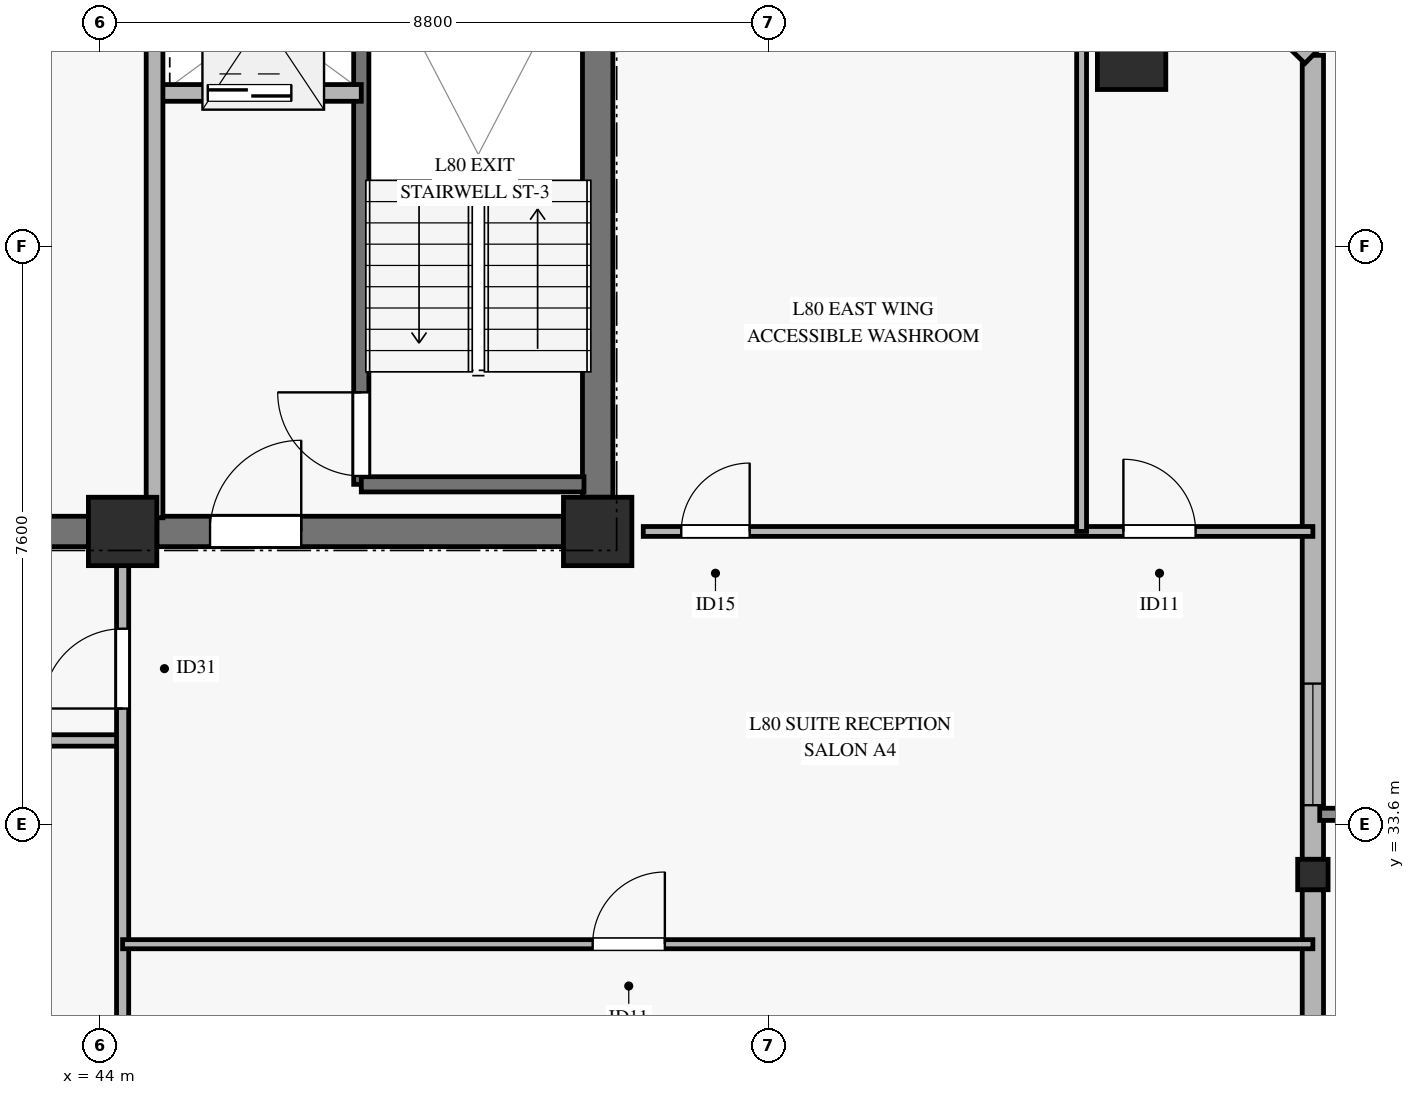
"""IFC4 building model, lengths in metres.
Left out: names, types, materials, properties, quantities, classifications, styles, units other than length and angle.
Written with IfcOpenShell. Run it as: python <this file> out.ifc"""

import sys

from ifc_helpers import new_model, si_unit, direction, frame, frame_2d, origin, origin_2d, place, context, subcontext, project, spatial, rectangle, hollow_rectangle, extrude, source, transform, mapped, element, fill, save


model = new_model("IFC4")
c1 = context("Model", 3, precision=1e-05, world=origin(), true_north=direction((0.0, 1.0)))
c2 = subcontext(c1, "Body", "Model", "MODEL_VIEW")
j1 = project(units=[si_unit("LENGTHUNIT", "METRE"), si_unit("PLANEANGLEUNIT", "RADIAN")], contexts=[c1])
p1 = place(None, origin())
s1 = spatial("IfcSite", under=j1, at=p1, CompositionType="ELEMENT")
p2 = place(p1, origin())
s2 = spatial("IfcBuilding", under=s1, at=p2, CompositionType="ELEMENT")
p3 = place(p2, frame((0.0, 0.0, 310.8)))
s3 = spatial("IfcBuildingStorey", under=s2, at=p3, CompositionType="ELEMENT", Elevation=310.8)
m1 = source(origin(), c2, "Body", "SweptSolid", [
    extrude(rectangle(XDim=0.9, YDim=0.9, at=origin_2d()), origin(), (0.0, 0.0, 1.0), 3.185),
])
for number, where, z_axis, x_axis in (
    (1, (44.3, 37.45, 0.0), (0.0, 0.0, 1.0), (1.0, 0.0, 0.0)),
    (2, (50.55, 37.45, 0.0), (0.0, 0.0, 1.0), (1.0, 0.0, 0.0)),
):
    element("IfcColumn", number, at=place(p3, frame(where, z_axis=z_axis, x_axis=x_axis)), inside=s3, PredefinedType="PILASTER", context=c2, shape_type="MappedRepresentation", body=[
        mapped(m1, transform((0.0, 0.0, 0.0), x_axis=(1.0, 0.0, 0.0), y_axis=(0.0, 1.0, 0.0), z_axis=(0.0, 0.0, 1.0), scale=1.0)),
    ])
p4 = place(p3, frame((36.05, 37.45, 0.0), z_axis=(0.0, 0.0, 1.0), x_axis=(1.0, 0.0, 0.0)))
e3 = element("IfcWall", 3, at=p4, inside=s3, PredefinedType="SHEAR", context=c2, shape_type="SweptSolid", body=[
    extrude(rectangle(XDim=7.8, YDim=0.4, at=frame_2d((3.9, 0.0))), origin(), (0.0, 0.0, 1.0), 3.185),
])
p5 = place(p3, frame((44.75, 37.45, 0.0), z_axis=(0.0, 0.0, 1.0), x_axis=(1.0, 0.0, 0.0)))
e4 = element("IfcWall", 4, at=p5, inside=s3, PredefinedType="SHEAR", context=c2, shape_type="SweptSolid", body=[
    extrude(rectangle(XDim=5.35, YDim=0.4, at=frame_2d((2.675, 0.0))), origin(), (0.0, 0.0, 1.0), 3.185),
])
p6 = place(p5, frame((0.7, 0.0, 0.0)))
e5 = element("IfcOpeningElement", 5, at=p6, cuts=e4, PredefinedType="OPENING", context=c2, shape_type="SweptSolid", body=[
    extrude(rectangle(XDim=1.2, YDim=2.15, at=frame_2d((0.6, 1.075))), frame((0.0, 0.21, 0.0), z_axis=(0.0, -1.0, 0.0), x_axis=(1.0, 0.0, 0.0)), (0.0, 0.0, 1.0), 0.42),
])
p7 = place(p3, frame((50.55, 37.9, 0.0), z_axis=(0.0, 0.0, 1.0), x_axis=(0.0, 1.0, 0.0)))
e6 = element("IfcWall", 6, at=p7, inside=s3, PredefinedType="SHEAR", context=c2, shape_type="SweptSolid", body=[
    extrude(rectangle(XDim=8.2, YDim=0.4, at=frame_2d((4.1, 0.0))), origin(), (0.0, 0.0, 1.0), 3.185),
])
m2 = source(origin(), c2, "Body", "SweptSolid", [
    extrude(hollow_rectangle(XDim=0.9, YDim=0.9, WallThickness=0.04, at=origin_2d()), origin(), (0.0, 0.0, 1.0), 3.207),
])
p8 = place(p3, frame((57.575, 43.715, 0.0), z_axis=(-0.114438458141, 0.014618884872, 0.993322771059), x_axis=(-0.126714787137, -0.991939193056, 0.0)))
e7 = element("IfcColumn", 7, at=p8, inside=s3, PredefinedType="COLUMN", context=c2, shape_type="MappedRepresentation", body=[
    mapped(m2, transform((0.0, 0.0, 0.0), x_axis=(1.0, 0.0, 0.0), y_axis=(0.0, 1.0, 0.0), z_axis=(0.0, 0.0, 1.0), scale=1.0)),
])
m3 = source(origin(), c2, "Body", "SweptSolid", [
    extrude(hollow_rectangle(XDim=0.4, YDim=0.4, WallThickness=0.02, at=origin_2d()), origin(), (0.0, 0.0, 1.0), 3.246),
])
p9 = place(p3, frame((59.96, 32.936, 0.0), z_axis=(-0.127580545586, 0.143603338163, 0.981377239219), x_axis=(-0.747582141628, -0.664169362075, 0.0)))
e8 = element("IfcColumn", 8, at=p9, inside=s3, PredefinedType="COLUMN", context=c2, shape_type="MappedRepresentation", body=[
    mapped(m3, transform((0.0, 0.0, 0.0), x_axis=(1.0, 0.0, 0.0), y_axis=(0.0, 1.0, 0.0), z_axis=(0.0, 0.0, 1.0), scale=1.0)),
])
p10 = place(p3, frame((59.96, 22.157, 0.0), z_axis=(0.0, 0.0, 1.0), x_axis=(0.0, 1.0, 0.0)))
e9 = element("IfcWall", 9, at=p10, inside=s3, PredefinedType="SOLIDWALL", context=c2, shape_type="SweptSolid", body=[
    extrude(rectangle(XDim=10.579, YDim=0.28, at=frame_2d((5.29, 0.0))), origin(), (0.0, 0.0, 1.0), 2.815),
])
p11 = place(p10, frame((1.705, 0.0, 0.45)))
e10 = element("IfcOpeningElement", 10, at=p11, cuts=e9, PredefinedType="OPENING", context=c2, shape_type="SweptSolid", body=[
    extrude(rectangle(XDim=2.2, YDim=2.1, at=frame_2d((1.1, 1.05))), frame((0.0, 0.15, 0.0), z_axis=(0.0, -1.0, 0.0), x_axis=(1.0, 0.0, 0.0)), (0.0, 0.0, 1.0), 0.3),
])
p12 = place(p10, frame((6.68, 0.0, 0.45)))
e11 = element("IfcOpeningElement", 11, at=p12, cuts=e9, PredefinedType="OPENING", context=c2, shape_type="SweptSolid", body=[
    extrude(rectangle(XDim=2.2, YDim=2.1, at=frame_2d((1.1, 1.05))), frame((0.0, 0.15, 0.0), z_axis=(0.0, -1.0, 0.0), x_axis=(1.0, 0.0, 0.0)), (0.0, 0.0, 1.0), 0.3),
])
p13 = place(p3, frame((59.96, 33.136, 0.0), z_axis=(0.0, 0.0, 1.0), x_axis=(0.0, 1.0, 0.0)))
e12 = element("IfcWall", 12, at=p13, inside=s3, PredefinedType="SOLIDWALL", context=c2, shape_type="SweptSolid", body=[
    extrude(rectangle(XDim=10.579, YDim=0.28, at=frame_2d((5.29, 0.0))), origin(), (0.0, 0.0, 1.0), 2.815),
])
p14 = place(p13, frame((0.712, 0.0, 0.45)))
e13 = element("IfcOpeningElement", 13, at=p14, cuts=e12, PredefinedType="OPENING", context=c2, shape_type="SweptSolid", body=[
    extrude(rectangle(XDim=1.6, YDim=2.0, at=frame_2d((0.8, 1.0))), frame((0.0, 0.15, 0.0), z_axis=(0.0, -1.0, 0.0), x_axis=(1.0, 0.0, 0.0)), (0.0, 0.0, 1.0), 0.3),
])
p15 = place(p3, frame((59.96, 43.715, 0.0), z_axis=(0.0, 0.0, 1.0), x_axis=(-0.713984922877, 0.700161074257, 0.0)))
e14 = element("IfcWall", 14, at=p15, inside=s3, PredefinedType="SOLIDWALL", context=c2, shape_type="SweptSolid", body=[
    extrude(rectangle(XDim=3.62, YDim=0.3, at=frame_2d((1.81, 0.0))), origin(), (0.0, 0.0, 1.0), 2.815),
])
p16 = place(p15, frame((1.01, 0.0, 0.45)))
e15 = element("IfcOpeningElement", 15, at=p16, cuts=e14, PredefinedType="OPENING", context=c2, shape_type="SweptSolid", body=[
    extrude(rectangle(XDim=1.6, YDim=2.0, at=frame_2d((0.8, 1.0))), frame((0.0, 0.16, 0.0), z_axis=(0.0, -1.0, 0.0), x_axis=(1.0, 0.0, 0.0)), (0.0, 0.0, 1.0), 0.32),
])
p17 = place(p3, frame((47.44, 38.07, 0.0), z_axis=(0.0, 0.0, 1.0), x_axis=(0.0, 1.0, 0.0)))
e16 = element("IfcWall", 16, at=p17, inside=s3, PredefinedType="SOLIDWALL", context=c2, shape_type="SweptSolid", body=[
    extrude(rectangle(XDim=7.25, YDim=0.2, at=frame_2d((3.625, 0.0))), origin(), (0.0, 0.0, 1.0), 3.4),
])
p18 = place(p17, frame((0.11, 0.0, 0.0)))
e17 = element("IfcOpeningElement", 17, at=p18, cuts=e16, PredefinedType="OPENING", context=c2, shape_type="SweptSolid", body=[
    extrude(rectangle(XDim=1.1, YDim=2.15, at=frame_2d((0.55, 1.075))), frame((0.0, 0.11, 0.0), z_axis=(0.0, -1.0, 0.0), x_axis=(1.0, 0.0, 0.0)), (0.0, 0.0, 1.0), 0.22),
])
p19 = place(p3, frame((47.44, 38.07, 0.0), z_axis=(0.0, 0.0, 1.0), x_axis=(1.0, 0.0, 0.0)))
e18 = element("IfcWall", 18, at=p19, inside=s3, PredefinedType="SOLIDWALL", context=c2, shape_type="SweptSolid", body=[
    extrude(rectangle(XDim=2.93, YDim=0.2, at=frame_2d((1.465, 0.0))), origin(), (0.0, 0.0, 1.0), 3.4),
])
p20 = place(p3, frame((44.72, 43.22, 0.0), z_axis=(0.0, 0.0, 1.0), x_axis=(1.0, 0.0, 0.0)))
e19 = element("IfcWall", 19, at=p20, inside=s3, PredefinedType="SOLIDWALL", context=c2, shape_type="SweptSolid", body=[
    extrude(rectangle(XDim=2.72, YDim=0.22, at=frame_2d((1.36, 0.0))), origin(), (0.0, 0.0, 1.0), 3.185),
])
p21 = place(p20, frame((0.7, 0.0, 0.0)))
e20 = element("IfcOpeningElement", 20, at=p21, cuts=e19, PredefinedType="OPENING", context=c2, shape_type="SweptSolid", body=[
    extrude(rectangle(XDim=1.1, YDim=2.2, at=frame_2d((0.55, 1.1))), frame((0.0, 0.12, 0.0), z_axis=(0.0, -1.0, 0.0), x_axis=(1.0, 0.0, 0.0)), (0.0, 0.0, 1.0), 0.24),
])
p22 = place(p3, frame((44.72, 37.63, 0.0), z_axis=(0.0, 0.0, 1.0), x_axis=(0.0, 1.0, 0.0)))
e21 = element("IfcWall", 21, at=p22, inside=s3, PredefinedType="SOLIDWALL", context=c2, shape_type="SweptSolid", body=[
    extrude(rectangle(XDim=7.59, YDim=0.22, at=frame_2d((3.795, 0.0))), origin(), (0.0, 0.0, 1.0), 3.185),
])
p23 = place(p3, frame((21.2, 34.7, 0.0), z_axis=(0.0, 0.0, 1.0), x_axis=(1.0, 0.0, 0.0)))
e22 = element("IfcWall", 22, at=p23, inside=s3, PredefinedType="PARTITIONING", context=c2, shape_type="SweptSolid", body=[
    extrude(rectangle(XDim=23.1, YDim=0.15, at=frame_2d((11.55, 0.0))), origin(), (0.0, 0.0, 1.0), 2.47),
])
p24 = place(p23, frame((5.185, 0.0, 0.0)))
e23 = element("IfcOpeningElement", 23, at=p24, cuts=e22, PredefinedType="OPENING", context=c2, shape_type="SweptSolid", body=[
    extrude(rectangle(XDim=1.05, YDim=2.15, at=frame_2d((0.525, 1.075))), frame((0.0, 0.085, 0.0), z_axis=(0.0, -1.0, 0.0), x_axis=(1.0, 0.0, 0.0)), (0.0, 0.0, 1.0), 0.17),
])
p25 = place(p23, frame((17.131, 0.0, 0.0)))
e24 = element("IfcOpeningElement", 24, at=p25, cuts=e22, PredefinedType="OPENING", context=c2, shape_type="SweptSolid", body=[
    extrude(rectangle(XDim=1.05, YDim=2.15, at=frame_2d((0.525, 1.075))), frame((0.0, 0.085, 0.0), z_axis=(0.0, -1.0, 0.0), x_axis=(1.0, 0.0, 0.0)), (0.0, 0.0, 1.0), 0.17),
])
p26 = place(p3, frame((44.3, 19.772, 0.0), z_axis=(0.0, 0.0, 1.0), x_axis=(0.0, 1.0, 0.0)))
e25 = element("IfcWall", 25, at=p26, inside=s3, PredefinedType="PARTITIONING", context=c2, shape_type="SweptSolid", body=[
    extrude(rectangle(XDim=17.678, YDim=0.16, at=frame_2d((8.839, 0.0))), origin(), (0.0, 0.0, 1.0), 2.47),
])
p27 = place(p26, frame((15.348, 0.0, 0.0)))
e26 = element("IfcOpeningElement", 26, at=p27, cuts=e25, PredefinedType="OPENING", context=c2, shape_type="SweptSolid", body=[
    extrude(rectangle(XDim=1.05, YDim=2.15, at=frame_2d((0.525, 1.075))), frame((0.0, 0.09, 0.0), z_axis=(0.0, -1.0, 0.0), x_axis=(1.0, 0.0, 0.0)), (0.0, 0.0, 1.0), 0.18),
])
p28 = place(p3, frame((44.3, 32.019, 0.0), z_axis=(0.0, 0.0, 1.0), x_axis=(1.0, 0.0, 0.0)))
e27 = element("IfcWall", 27, at=p28, inside=s3, PredefinedType="PARTITIONING", context=c2, shape_type="SweptSolid", body=[
    extrude(rectangle(XDim=15.66, YDim=0.12, at=frame_2d((7.83, 0.0))), origin(), (0.0, 0.0, 1.0), 2.47),
])
p29 = place(p28, frame((6.184, 0.0, 0.0)))
e28 = element("IfcOpeningElement", 28, at=p29, cuts=e27, PredefinedType="OPENING", context=c2, shape_type="SweptSolid", body=[
    extrude(rectangle(XDim=0.95, YDim=2.1, at=frame_2d((0.475, 1.05))), frame((0.0, 0.07, 0.0), z_axis=(0.0, -1.0, 0.0), x_axis=(1.0, 0.0, 0.0)), (0.0, 0.0, 1.0), 0.14),
])
p30 = place(p3, frame((51.15, 37.45, 0.0), z_axis=(0.0, 0.0, 1.0), x_axis=(1.0, 0.0, 0.0)))
e29 = element("IfcWall", 29, at=p30, inside=s3, PredefinedType="PARTITIONING", context=c2, shape_type="SweptSolid", body=[
    extrude(rectangle(XDim=8.81, YDim=0.13, at=frame_2d((4.405, 0.0))), origin(), (0.0, 0.0, 1.0), 2.82),
])
p31 = place(p30, frame((0.5, 0.0, 0.0)))
e30 = element("IfcOpeningElement", 30, at=p31, cuts=e29, PredefinedType="OPENING", context=c2, shape_type="SweptSolid", body=[
    extrude(rectangle(XDim=0.9, YDim=2.1, at=frame_2d((0.45, 1.05))), frame((0.0, 0.075, 0.0), z_axis=(0.0, -1.0, 0.0), x_axis=(1.0, 0.0, 0.0)), (0.0, 0.0, 1.0), 0.15),
])
p32 = place(p30, frame((6.317, 0.0, 0.0)))
e31 = element("IfcOpeningElement", 31, at=p32, cuts=e29, PredefinedType="OPENING", context=c2, shape_type="SweptSolid", body=[
    extrude(rectangle(XDim=0.95, YDim=2.1, at=frame_2d((0.475, 1.05))), frame((0.0, 0.075, 0.0), z_axis=(0.0, -1.0, 0.0), x_axis=(1.0, 0.0, 0.0)), (0.0, 0.0, 1.0), 0.15),
])
p33 = place(p3, frame((56.917, 37.45, 0.0), z_axis=(0.0, 0.0, 1.0), x_axis=(0.0, 1.0, 0.0)))
e32 = element("IfcWall", 32, at=p33, inside=s3, PredefinedType="PARTITIONING", context=c2, shape_type="SweptSolid", body=[
    extrude(rectangle(XDim=8.8, YDim=0.13, at=frame_2d((4.4, 0.0))), origin(), (0.0, 0.0, 1.0), 2.82),
])
m4 = source(origin(), c2, "Body", "SweptSolid", [
    extrude(rectangle(XDim=1.6, YDim=2.0, at=frame_2d((0.8, 1.0))), frame((0.0, 0.03, 0.0), z_axis=(0.0, -1.0, 0.0), x_axis=(1.0, 0.0, 0.0)), (0.0, 0.0, 1.0), 0.06),
])
p34 = place(p14, origin())
e33 = element("IfcWindow", 33, at=p34, inside=s3, PartitioningType="SINGLE_PANEL", PredefinedType="WINDOW", context=c2, shape_type="MappedRepresentation", body=[
    mapped(m4, transform((0.0, 0.0, 0.0), x_axis=(1.0, 0.0, 0.0), y_axis=(0.0, 1.0, 0.0), z_axis=(0.0, 0.0, 1.0), scale=1.0)),
])
fill(e13, e33)
m5 = source(origin(), c2, "Body", "SweptSolid", [
    extrude(rectangle(XDim=1.1, YDim=2.15, at=frame_2d((0.55, 1.075))), frame((0.0, 0.025, 0.0), z_axis=(0.0, -1.0, 0.0), x_axis=(1.0, 0.0, 0.0)), (0.0, 0.0, 1.0), 0.05),
])
p35 = place(p18, origin())
e34 = element("IfcDoor", 34, at=p35, inside=s3, OperationType="SINGLE_SWING_RIGHT", PredefinedType="DOOR", context=c2, shape_type="MappedRepresentation", body=[
    mapped(m5, transform((0.0, 0.0, 0.0), x_axis=(1.0, 0.0, 0.0), y_axis=(0.0, 1.0, 0.0), z_axis=(0.0, 0.0, 1.0), scale=1.0)),
])
fill(e17, e34)
m6 = source(origin(), c2, "Body", "SweptSolid", [
    extrude(rectangle(XDim=1.1, YDim=2.2, at=frame_2d((0.55, 1.1))), frame((0.0, 0.025, 0.0), z_axis=(0.0, -1.0, 0.0), x_axis=(1.0, 0.0, 0.0)), (0.0, 0.0, 1.0), 0.05),
])
p36 = place(p21, origin())
e35 = element("IfcDoor", 35, at=p36, inside=s3, OperationType="SLIDING_TO_LEFT", PredefinedType="DOOR", context=c2, shape_type="MappedRepresentation", body=[
    mapped(m6, transform((0.0, 0.0, 0.0), x_axis=(1.0, 0.0, 0.0), y_axis=(0.0, 1.0, 0.0), z_axis=(0.0, 0.0, 1.0), scale=1.0)),
])
fill(e20, e35)
m7 = source(origin(), c2, "Body", "SweptSolid", [
    extrude(rectangle(XDim=1.2, YDim=2.15, at=frame_2d((0.6, 1.075))), frame((0.0, 0.025, 0.0), z_axis=(0.0, -1.0, 0.0), x_axis=(1.0, 0.0, 0.0)), (0.0, 0.0, 1.0), 0.05),
])
p37 = place(p6, origin())
e36 = element("IfcDoor", 36, at=p37, inside=s3, OperationType="SINGLE_SWING_RIGHT", PredefinedType="DOOR", context=c2, shape_type="MappedRepresentation", body=[
    mapped(m7, transform((0.0, 0.0, 0.0), x_axis=(1.0, 0.0, 0.0), y_axis=(0.0, 1.0, 0.0), z_axis=(0.0, 0.0, 1.0), scale=1.0)),
])
fill(e5, e36)
m8 = source(origin(), c2, "Body", "SweptSolid", [
    extrude(rectangle(XDim=1.05, YDim=2.15, at=frame_2d((0.525, 1.075))), frame((0.0, 0.025, 0.0), z_axis=(0.0, -1.0, 0.0), x_axis=(1.0, 0.0, 0.0)), (0.0, 0.0, 1.0), 0.05),
])
p38 = place(p27, origin())
e37 = element("IfcDoor", 37, at=p38, inside=s3, OperationType="SINGLE_SWING_LEFT", PredefinedType="DOOR", context=c2, shape_type="MappedRepresentation", body=[
    mapped(m8, transform((0.0, 0.0, 0.0), x_axis=(1.0, 0.0, 0.0), y_axis=(0.0, 1.0, 0.0), z_axis=(0.0, 0.0, 1.0), scale=1.0)),
])
fill(e26, e37)
m9 = source(origin(), c2, "Body", "SweptSolid", [
    extrude(rectangle(XDim=0.95, YDim=2.1, at=frame_2d((0.475, 1.05))), frame((0.0, 0.025, 0.0), z_axis=(0.0, -1.0, 0.0), x_axis=(1.0, 0.0, 0.0)), (0.0, 0.0, 1.0), 0.05),
])
p39 = place(p29, origin())
e38 = element("IfcDoor", 38, at=p39, inside=s3, OperationType="SINGLE_SWING_RIGHT", PredefinedType="DOOR", context=c2, shape_type="MappedRepresentation", body=[
    mapped(m9, transform((0.0, 0.0, 0.0), x_axis=(1.0, 0.0, 0.0), y_axis=(0.0, 1.0, 0.0), z_axis=(0.0, 0.0, 1.0), scale=1.0)),
])
fill(e28, e38)
m10 = source(origin(), c2, "Body", "SweptSolid", [
    extrude(rectangle(XDim=0.9, YDim=2.1, at=frame_2d((0.45, 1.05))), frame((0.0, 0.025, 0.0), z_axis=(0.0, -1.0, 0.0), x_axis=(1.0, 0.0, 0.0)), (0.0, 0.0, 1.0), 0.05),
])
p40 = place(p31, origin())
e39 = element("IfcDoor", 39, at=p40, inside=s3, OperationType="SINGLE_SWING_RIGHT", PredefinedType="DOOR", context=c2, shape_type="MappedRepresentation", body=[
    mapped(m10, transform((0.0, 0.0, 0.0), x_axis=(1.0, 0.0, 0.0), y_axis=(0.0, 1.0, 0.0), z_axis=(0.0, 0.0, 1.0), scale=1.0)),
])
fill(e30, e39)
p41 = place(p32, origin())
e40 = element("IfcDoor", 40, at=p41, inside=s3, OperationType="SINGLE_SWING_LEFT", PredefinedType="DOOR", context=c2, shape_type="MappedRepresentation", body=[
    mapped(m9, transform((0.0, 0.0, 0.0), x_axis=(1.0, 0.0, 0.0), y_axis=(0.0, 1.0, 0.0), z_axis=(0.0, 0.0, 1.0), scale=1.0)),
])
fill(e31, e40)
save(model, sys.argv[1])
